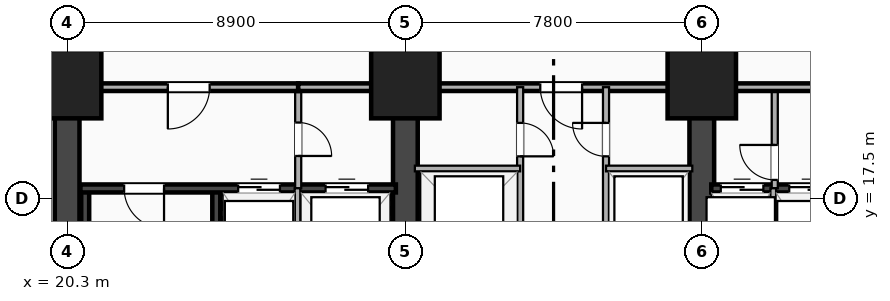
"""IFC4 building model, lengths in metres.
Left out: names, types, materials, properties, quantities, classifications, styles, units other than length and angle.
Written with IfcOpenShell. Run it as: python <this file> out.ifc"""

import sys

from ifc_helpers import new_model, si_unit, direction, frame, frame_2d, origin, origin_2d, place, context, subcontext, project, spatial, rectangle, extrude, element, fill, save


model = new_model("IFC4")
c1 = context("Model", 3, precision=1e-05, world=origin(), true_north=direction((0.0, 1.0)))
c2 = subcontext(c1, "Body", "Model", "MODEL_VIEW")
j1 = project(units=[si_unit("LENGTHUNIT", "METRE"), si_unit("PLANEANGLEUNIT", "RADIAN")], contexts=[c1])
p1 = place(None, origin())
s1 = spatial("IfcSite", under=j1, at=p1, CompositionType="ELEMENT")
p2 = place(p1, origin())
s2 = spatial("IfcBuilding", under=s1, at=p2, CompositionType="ELEMENT")
p3 = place(p2, origin())
s3 = spatial("IfcBuildingStorey", under=s2, at=p3, CompositionType="ELEMENT", Elevation=0.0)
p4 = place(p3, frame((20.3, 3.5, 0.0), z_axis=(0.0, 0.0, 1.0), x_axis=(0.0, 1.0, 0.0)))
e1 = element("IfcWall", 1, at=p4, inside=s3, PredefinedType="SHEAR", context=c2, shape_type="SweptSolid", body=[
    extrude(rectangle(XDim=16.9, YDim=0.65, at=frame_2d((8.45, 0.0))), origin(), (0.0, 0.0, 1.0), 5.1),
])
p5 = place(p3, frame((29.2, 3.5, 0.0), z_axis=(0.0, 0.0, 1.0), x_axis=(0.0, 1.0, 0.0)))
e2 = element("IfcWall", 2, at=p5, inside=s3, PredefinedType="SHEAR", context=c2, shape_type="SweptSolid", body=[
    extrude(rectangle(XDim=16.9, YDim=0.65, at=frame_2d((8.45, 0.0))), origin(), (0.0, 0.0, 1.0), 5.1),
])
p6 = place(p5, frame((7.75, 0.0, 0.0), z_axis=(0.0, 0.0, 1.0), x_axis=(-1.0, 0.0, 0.0)))
e3 = element("IfcOpeningElement", 3, at=p6, cuts=e2, PredefinedType="OPENING", context=c2, shape_type="SweptSolid", body=[
    extrude(rectangle(XDim=1.1, YDim=2.15, at=frame_2d((0.55, 1.075))), frame((0.0, 0.335, 0.0), z_axis=(0.0, -1.0, 0.0), x_axis=(1.0, 0.0, 0.0)), (0.0, 0.0, 1.0), 0.67),
])
p7 = place(p3, frame((37.0, 3.5, 0.0), z_axis=(0.0, 0.0, 1.0), x_axis=(0.0, 1.0, 0.0)))
e4 = element("IfcWall", 4, at=p7, inside=s3, PredefinedType="SHEAR", context=c2, shape_type="SweptSolid", body=[
    extrude(rectangle(XDim=16.9, YDim=0.65, at=frame_2d((8.45, 0.0))), origin(), (0.0, 0.0, 1.0), 5.1),
])
p8 = place(p7, frame((6.65, 0.0, 0.0)))
e5 = element("IfcOpeningElement", 5, at=p8, cuts=e4, PredefinedType="OPENING", context=c2, shape_type="SweptSolid", body=[
    extrude(rectangle(XDim=1.1, YDim=2.15, at=frame_2d((0.55, 1.075))), frame((0.0, 0.335, 0.0), z_axis=(0.0, -1.0, 0.0), x_axis=(1.0, 0.0, 0.0)), (0.0, 0.0, 1.0), 0.67),
])
for number, where, z_axis, x_axis in (
    (6, (20.775, 9.745, 0.0), (0.0, 0.0, 1.0), (0.0, 1.0, 0.0)),
    (7, (24.225, 9.745, 0.0), (0.0, 0.0, 1.0), (0.0, 1.0, 0.0)),
):
    element("IfcWall", number, at=place(p3, frame(where, z_axis=z_axis, x_axis=x_axis)), inside=s3, PredefinedType="SHEAR", context=c2, shape_type="SweptSolid", body=[
        extrude(rectangle(XDim=8.01, YDim=0.21, at=frame_2d((4.005, 0.0))), origin(), (0.0, 0.0, 1.0), 5.1),
    ])
p9 = place(p3, frame((20.65, 17.755, 0.0), z_axis=(0.0, 0.0, 1.0), x_axis=(1.0, 0.0, 0.0)))
e8 = element("IfcWall", 8, at=p9, inside=s3, PredefinedType="SHEAR", context=c2, shape_type="SweptSolid", body=[
    extrude(rectangle(XDim=8.3, YDim=0.21, at=frame_2d((4.15, 0.0))), origin(), (0.0, 0.0, 1.0), 5.1),
])
p10 = place(p9, frame((1.15, 0.0, 0.0)))
e9 = element("IfcOpeningElement", 9, at=p10, cuts=e8, PredefinedType="OPENING", context=c2, shape_type="SweptSolid", body=[
    extrude(rectangle(XDim=1.05, YDim=2.15, at=frame_2d((0.525, 1.075))), frame((0.0, 0.115, 0.0), z_axis=(0.0, -1.0, 0.0), x_axis=(1.0, 0.0, 0.0)), (0.0, 0.0, 1.0), 0.23),
])
p11 = place(p9, frame((4.15, 0.0, 0.0)))
e10 = element("IfcOpeningElement", 10, at=p11, cuts=e8, PredefinedType="OPENING", context=c2, shape_type="SweptSolid", body=[
    extrude(rectangle(XDim=1.1, YDim=2.18, at=frame_2d((0.55, 1.09))), frame((0.0, 0.115, 0.0), z_axis=(0.0, -1.0, 0.0), x_axis=(1.0, 0.0, 0.0)), (0.0, 0.0, 1.0), 0.23),
])
p12 = place(p9, frame((6.45, 0.0, 0.0)))
e11 = element("IfcOpeningElement", 11, at=p12, cuts=e8, PredefinedType="OPENING", context=c2, shape_type="SweptSolid", body=[
    extrude(rectangle(XDim=1.12, YDim=2.2, at=frame_2d((0.56, 1.1))), frame((0.0, 0.115, 0.0), z_axis=(0.0, -1.0, 0.0), x_axis=(1.0, 0.0, 0.0)), (0.0, 0.0, 1.0), 0.23),
])
p13 = place(p3, frame((37.25, 17.755, 0.0), z_axis=(0.0, 0.0, 1.0), x_axis=(1.0, 0.0, 0.0)))
e12 = element("IfcWall", 12, at=p13, inside=s3, PredefinedType="SHEAR", context=c2, shape_type="SweptSolid", body=[
    extrude(rectangle(XDim=7.2, YDim=0.21, at=frame_2d((3.6, 0.0))), origin(), (0.0, 0.0, 1.0), 5.1),
])
p14 = place(p13, frame((0.25, 0.0, 0.0)))
e13 = element("IfcOpeningElement", 13, at=p14, cuts=e12, PredefinedType="OPENING", context=c2, shape_type="SweptSolid", body=[
    extrude(rectangle(XDim=1.12, YDim=2.2, at=frame_2d((0.56, 1.1))), frame((0.0, 0.115, 0.0), z_axis=(0.0, -1.0, 0.0), x_axis=(1.0, 0.0, 0.0)), (0.0, 0.0, 1.0), 0.23),
])
p15 = place(p13, frame((2.05, 0.0, 0.0)))
e14 = element("IfcOpeningElement", 14, at=p15, cuts=e12, PredefinedType="OPENING", context=c2, shape_type="SweptSolid", body=[
    extrude(rectangle(XDim=1.1, YDim=2.18, at=frame_2d((0.55, 1.09))), frame((0.0, 0.115, 0.0), z_axis=(0.0, -1.0, 0.0), x_axis=(1.0, 0.0, 0.0)), (0.0, 0.0, 1.0), 0.23),
])
p16 = place(p13, frame((4.73, 0.0, 0.0)))
e15 = element("IfcOpeningElement", 15, at=p16, cuts=e12, PredefinedType="OPENING", context=c2, shape_type="SweptSolid", body=[
    extrude(rectangle(XDim=1.05, YDim=2.15, at=frame_2d((0.525, 1.075))), frame((0.0, 0.115, 0.0), z_axis=(0.0, -1.0, 0.0), x_axis=(1.0, 0.0, 0.0)), (0.0, 0.0, 1.0), 0.23),
])
for number, where, z_axis, x_axis in (
    (16, (20.3, 20.5, -0.35), (0.0, 0.0, 1.0), (1.0, 0.0, 0.0)),
    (17, (29.2, 20.5, -0.35), (0.0, 0.0, 1.0), (1.0, 0.0, 0.0)),
    (18, (37.0, 20.5, -0.35), (0.0, 0.0, 1.0), (1.0, 0.0, 0.0)),
):
    element("IfcColumn", number, at=place(p3, frame(where, z_axis=z_axis, x_axis=x_axis)), inside=s3, PredefinedType="COLUMN", context=c2, shape_type="SweptSolid", body=[
        extrude(rectangle(XDim=1.8, YDim=1.8, at=origin_2d()), origin(), (0.0, 0.0, 1.0), 5.45),
    ])
p17 = place(p3, frame((26.38, 17.76, 0.0), z_axis=(0.0, 0.0, 1.0), x_axis=(0.0, 1.0, 0.0)))
e19 = element("IfcWall", 19, at=p17, inside=s3, PredefinedType="PARTITIONING", context=c2, shape_type="SweptSolid", body=[
    extrude(rectangle(XDim=2.66, YDim=0.16, at=frame_2d((1.33, 0.0))), origin(), (0.0, 0.0, 1.0), 2.735),
])
p18 = place(p17, frame((0.85, 0.0, 0.0)))
e20 = element("IfcOpeningElement", 20, at=p18, cuts=e19, PredefinedType="OPENING", context=c2, shape_type="SweptSolid", body=[
    extrude(rectangle(XDim=0.88, YDim=2.08, at=frame_2d((0.44, 1.04))), frame((0.0, 0.09, 0.0), z_axis=(0.0, -1.0, 0.0), x_axis=(1.0, 0.0, 0.0)), (0.0, 0.0, 1.0), 0.18),
])
p19 = place(p3, frame((38.92, 17.76, 0.0), z_axis=(0.0, 0.0, 1.0), x_axis=(0.0, 1.0, 0.0)))
e21 = element("IfcWall", 21, at=p19, inside=s3, PredefinedType="PARTITIONING", context=c2, shape_type="SweptSolid", body=[
    extrude(rectangle(XDim=2.66, YDim=0.16, at=frame_2d((1.33, 0.0))), origin(), (0.0, 0.0, 1.0), 4.164),
])
p20 = place(p19, frame((1.14, 0.0, 0.0), z_axis=(0.0, 0.0, 1.0), x_axis=(-1.0, 0.0, 0.0)))
e22 = element("IfcOpeningElement", 22, at=p20, cuts=e21, PredefinedType="OPENING", context=c2, shape_type="SweptSolid", body=[
    extrude(rectangle(XDim=0.92, YDim=2.08, at=frame_2d((0.46, 1.04))), frame((0.0, 0.09, 0.0), z_axis=(0.0, -1.0, 0.0), x_axis=(1.0, 0.0, 0.0)), (0.0, 0.0, 1.0), 0.18),
])
for number, where, z_axis, x_axis in (
    (23, (26.36, 14.72, 0.0), (0.0, 0.0, 1.0), (0.0, 1.0, 0.0)),
    (24, (38.88, 14.72, 0.0), (0.0, 0.0, 1.0), (0.0, 1.0, 0.0)),
):
    element("IfcWall", number, at=place(p3, frame(where, z_axis=z_axis, x_axis=x_axis)), inside=s3, PredefinedType="PARTITIONING", context=c2, shape_type="SweptSolid", body=[
        extrude(rectangle(XDim=3.04, YDim=0.15, at=frame_2d((1.52, 0.0))), origin(), (0.0, 0.0, 1.0), 5.1),
    ])
p21 = place(p3, frame((20.65, 20.42, 0.0), z_axis=(0.0, 0.0, 1.0), x_axis=(1.0, 0.0, 0.0)))
e25 = element("IfcWall", 25, at=p21, inside=s3, PredefinedType="PARTITIONING", context=c2, shape_type="SweptSolid", body=[
    extrude(rectangle(XDim=5.73, YDim=0.2, at=frame_2d((2.865, 0.0))), origin(), (0.0, 0.0, 1.0), 2.735),
])
p22 = place(p21, frame((2.3, 0.0, 0.0)))
e26 = element("IfcOpeningElement", 26, at=p22, cuts=e25, PredefinedType="OPENING", context=c2, shape_type="SweptSolid", body=[
    extrude(rectangle(XDim=1.1, YDim=2.15, at=frame_2d((0.55, 1.075))), frame((0.0, 0.11, 0.0), z_axis=(0.0, -1.0, 0.0), x_axis=(1.0, 0.0, 0.0)), (0.0, 0.0, 1.0), 0.22),
])
p23 = place(p3, frame((26.38, 20.42, 0.0), z_axis=(0.0, 0.0, 1.0), x_axis=(1.0, 0.0, 0.0)))
e27 = element("IfcWall", 27, at=p23, inside=s3, PredefinedType="PARTITIONING", context=c2, shape_type="SweptSolid", body=[
    extrude(rectangle(XDim=2.82, YDim=0.2, at=frame_2d((1.41, 0.0))), origin(), (0.0, 0.0, 1.0), 2.735),
])
p24 = place(p3, frame((29.2, 20.42, 0.0), z_axis=(0.0, 0.0, 1.0), x_axis=(1.0, 0.0, 0.0)))
e28 = element("IfcWall", 28, at=p24, inside=s3, PredefinedType="PARTITIONING", context=c2, shape_type="SweptSolid", body=[
    extrude(rectangle(XDim=7.8, YDim=0.2, at=frame_2d((3.9, 0.0))), origin(), (0.0, 0.0, 1.0), 2.735),
])
p25 = place(p24, frame((3.55, 0.0, 0.0)))
e29 = element("IfcOpeningElement", 29, at=p25, cuts=e28, PredefinedType="OPENING", context=c2, shape_type="SweptSolid", body=[
    extrude(rectangle(XDim=1.1, YDim=2.15, at=frame_2d((0.55, 1.075))), frame((0.0, 0.11, 0.0), z_axis=(0.0, -1.0, 0.0), x_axis=(1.0, 0.0, 0.0)), (0.0, 0.0, 1.0), 0.22),
])
p26 = place(p3, frame((37.0, 20.42, 0.0), z_axis=(0.0, 0.0, 1.0), x_axis=(1.0, 0.0, 0.0)))
e30 = element("IfcWall", 30, at=p26, inside=s3, PredefinedType="PARTITIONING", context=c2, shape_type="SweptSolid", body=[
    extrude(rectangle(XDim=7.45, YDim=0.2, at=frame_2d((3.725, 0.0))), origin(), (0.0, 0.0, 1.0), 4.164),
])
p27 = place(p26, frame((4.2, 0.0, 0.0)))
e31 = element("IfcOpeningElement", 31, at=p27, cuts=e30, PredefinedType="OPENING", context=c2, shape_type="SweptSolid", body=[
    extrude(rectangle(XDim=1.1, YDim=2.15, at=frame_2d((0.55, 1.075))), frame((0.0, 0.11, 0.0), z_axis=(0.0, -1.0, 0.0), x_axis=(1.0, 0.0, 0.0)), (0.0, 0.0, 1.0), 0.22),
])
p28 = place(p3, frame((32.22, 12.5, 0.0), z_axis=(0.0, 0.0, 1.0), x_axis=(0.0, 1.0, 0.0)))
e32 = element("IfcWall", 32, at=p28, inside=s3, PredefinedType="PARTITIONING", context=c2, shape_type="SweptSolid", body=[
    extrude(rectangle(XDim=7.92, YDim=0.16, at=frame_2d((3.96, 0.0))), origin(), (0.0, 0.0, 1.0), 4.164),
])
p29 = place(p28, frame((1.43, 0.0, 0.0), z_axis=(0.0, 0.0, 1.0), x_axis=(-1.0, 0.0, 0.0)))
e33 = element("IfcOpeningElement", 33, at=p29, cuts=e32, PredefinedType="OPENING", context=c2, shape_type="SweptSolid", body=[
    extrude(rectangle(XDim=1.08, YDim=2.16, at=frame_2d((0.54, 1.08))), frame((0.0, 0.09, 0.0), z_axis=(0.0, -1.0, 0.0), x_axis=(1.0, 0.0, 0.0)), (0.0, 0.0, 1.0), 0.18),
])
p30 = place(p28, frame((4.33, 0.0, 0.0), z_axis=(0.0, 0.0, 1.0), x_axis=(-1.0, 0.0, 0.0)))
e34 = element("IfcOpeningElement", 34, at=p30, cuts=e32, PredefinedType="OPENING", context=c2, shape_type="SweptSolid", body=[
    extrude(rectangle(XDim=1.08, YDim=2.16, at=frame_2d((0.54, 1.08))), frame((0.0, 0.09, 0.0), z_axis=(0.0, -1.0, 0.0), x_axis=(1.0, 0.0, 0.0)), (0.0, 0.0, 1.0), 0.18),
])
p31 = place(p28, frame((6.1, 0.0, 0.0)))
e35 = element("IfcOpeningElement", 35, at=p31, cuts=e32, PredefinedType="OPENING", context=c2, shape_type="SweptSolid", body=[
    extrude(rectangle(XDim=0.88, YDim=2.08, at=frame_2d((0.44, 1.04))), frame((0.0, 0.09, 0.0), z_axis=(0.0, -1.0, 0.0), x_axis=(1.0, 0.0, 0.0)), (0.0, 0.0, 1.0), 0.18),
])
p32 = place(p3, frame((34.48, 12.5, 0.0), z_axis=(0.0, 0.0, 1.0), x_axis=(0.0, 1.0, 0.0)))
e36 = element("IfcWall", 36, at=p32, inside=s3, PredefinedType="PARTITIONING", context=c2, shape_type="SweptSolid", body=[
    extrude(rectangle(XDim=7.92, YDim=0.16, at=frame_2d((3.96, 0.0))), origin(), (0.0, 0.0, 1.0), 4.164),
])
p33 = place(p32, frame((0.35, 0.0, 0.0)))
e37 = element("IfcOpeningElement", 37, at=p33, cuts=e36, PredefinedType="OPENING", context=c2, shape_type="SweptSolid", body=[
    extrude(rectangle(XDim=1.08, YDim=2.16, at=frame_2d((0.54, 1.08))), frame((0.0, 0.09, 0.0), z_axis=(0.0, -1.0, 0.0), x_axis=(1.0, 0.0, 0.0)), (0.0, 0.0, 1.0), 0.18),
])
p34 = place(p32, frame((3.25, 0.0, 0.0)))
e38 = element("IfcOpeningElement", 38, at=p34, cuts=e36, PredefinedType="OPENING", context=c2, shape_type="SweptSolid", body=[
    extrude(rectangle(XDim=1.08, YDim=2.16, at=frame_2d((0.54, 1.08))), frame((0.0, 0.09, 0.0), z_axis=(0.0, -1.0, 0.0), x_axis=(1.0, 0.0, 0.0)), (0.0, 0.0, 1.0), 0.18),
])
p35 = place(p32, frame((6.98, 0.0, 0.0), z_axis=(0.0, 0.0, 1.0), x_axis=(-1.0, 0.0, 0.0)))
e39 = element("IfcOpeningElement", 39, at=p35, cuts=e36, PredefinedType="OPENING", context=c2, shape_type="SweptSolid", body=[
    extrude(rectangle(XDim=0.88, YDim=2.08, at=frame_2d((0.44, 1.04))), frame((0.0, 0.09, 0.0), z_axis=(0.0, -1.0, 0.0), x_axis=(1.0, 0.0, 0.0)), (0.0, 0.0, 1.0), 0.18),
])
p36 = place(p3, frame((29.45, 18.28, 0.0), z_axis=(0.0, 0.0, 1.0), x_axis=(1.0, 0.0, 0.0)))
e40 = element("IfcWall", 40, at=p36, inside=s3, PredefinedType="PARTITIONING", context=c2, shape_type="SweptSolid", body=[
    extrude(rectangle(XDim=2.77, YDim=0.15, at=frame_2d((1.385, 0.0))), origin(), (0.0, 0.0, 1.0), 4.23),
])
p37 = place(p3, frame((34.48, 18.28, 0.0), z_axis=(0.0, 0.0, 1.0), x_axis=(1.0, 0.0, 0.0)))
e41 = element("IfcWall", 41, at=p37, inside=s3, PredefinedType="PARTITIONING", context=c2, shape_type="SweptSolid", body=[
    extrude(rectangle(XDim=2.27, YDim=0.15, at=frame_2d((1.135, 0.0))), origin(), (0.0, 0.0, 1.0), 4.23),
])
p38 = place(p3, frame((17.9, 20.42, 0.0), z_axis=(0.0, 0.0, 1.0), x_axis=(1.0, 0.0, 0.0)))
e42 = element("IfcWall", 42, at=p38, inside=s3, PredefinedType="PARTITIONING", context=c2, shape_type="SweptSolid", body=[
    extrude(rectangle(XDim=2.4, YDim=0.2, at=frame_2d((1.2, 0.0))), origin(), (0.0, 0.0, 1.0), 2.735),
])
p39 = place(p10, origin())
e43 = element("IfcDoor", 43, at=p39, inside=s3, OperationType="SINGLE_SWING_RIGHT", PredefinedType="DOOR", context=c2, shape_type="SweptSolid", body=[
    extrude(rectangle(XDim=1.05, YDim=2.15, at=frame_2d((0.525, 1.075))), frame((0.0, 0.025, 0.0), z_axis=(0.0, -1.0, 0.0), x_axis=(1.0, 0.0, 0.0)), (0.0, 0.0, 1.0), 0.05),
])
fill(e9, e43)
p40 = place(p11, origin())
e44 = element("IfcDoor", 44, at=p40, inside=s3, OperationType="DOUBLE_DOOR_SLIDING", PredefinedType="DOOR", context=c2, shape_type="SweptSolid", body=[
    extrude(rectangle(XDim=1.1, YDim=2.18, at=frame_2d((0.55, 1.09))), frame((0.0, 0.025, 0.0), z_axis=(0.0, -1.0, 0.0), x_axis=(1.0, 0.0, 0.0)), (0.0, 0.0, 1.0), 0.05),
])
fill(e10, e44)
p41 = place(p12, origin())
e45 = element("IfcDoor", 45, at=p41, inside=s3, OperationType="DOUBLE_DOOR_SLIDING", PredefinedType="DOOR", context=c2, shape_type="SweptSolid", body=[
    extrude(rectangle(XDim=1.12, YDim=2.2, at=frame_2d((0.56, 1.1))), frame((0.0, 0.025, 0.0), z_axis=(0.0, -1.0, 0.0), x_axis=(1.0, 0.0, 0.0)), (0.0, 0.0, 1.0), 0.05),
])
fill(e11, e45)
p42 = place(p14, origin())
e46 = element("IfcDoor", 46, at=p42, inside=s3, OperationType="DOUBLE_DOOR_SLIDING", PredefinedType="DOOR", context=c2, shape_type="SweptSolid", body=[
    extrude(rectangle(XDim=1.12, YDim=2.2, at=frame_2d((0.56, 1.1))), frame((0.0, 0.025, 0.0), z_axis=(0.0, -1.0, 0.0), x_axis=(1.0, 0.0, 0.0)), (0.0, 0.0, 1.0), 0.05),
])
fill(e13, e46)
p43 = place(p15, origin())
e47 = element("IfcDoor", 47, at=p43, inside=s3, OperationType="DOUBLE_DOOR_SLIDING", PredefinedType="DOOR", context=c2, shape_type="SweptSolid", body=[
    extrude(rectangle(XDim=1.1, YDim=2.18, at=frame_2d((0.55, 1.09))), frame((0.0, 0.025, 0.0), z_axis=(0.0, -1.0, 0.0), x_axis=(1.0, 0.0, 0.0)), (0.0, 0.0, 1.0), 0.05),
])
fill(e14, e47)
p44 = place(p18, origin())
e48 = element("IfcDoor", 48, at=p44, inside=s3, OperationType="SINGLE_SWING_LEFT", PredefinedType="DOOR", context=c2, shape_type="SweptSolid", body=[
    extrude(rectangle(XDim=0.88, YDim=2.08, at=frame_2d((0.44, 1.04))), frame((0.0, 0.025, 0.0), z_axis=(0.0, -1.0, 0.0), x_axis=(1.0, 0.0, 0.0)), (0.0, 0.0, 1.0), 0.05),
])
fill(e20, e48)
p45 = place(p20, origin())
e49 = element("IfcDoor", 49, at=p45, inside=s3, OperationType="SINGLE_SWING_RIGHT", PredefinedType="DOOR", context=c2, shape_type="SweptSolid", body=[
    extrude(rectangle(XDim=0.92, YDim=2.08, at=frame_2d((0.46, 1.04))), frame((0.0, 0.025, 0.0), z_axis=(0.0, -1.0, 0.0), x_axis=(1.0, 0.0, 0.0)), (0.0, 0.0, 1.0), 0.05),
])
fill(e22, e49)
p46 = place(p22, origin())
e50 = element("IfcDoor", 50, at=p46, inside=s3, OperationType="SINGLE_SWING_LEFT", PredefinedType="DOOR", context=c2, shape_type="SweptSolid", body=[
    extrude(rectangle(XDim=1.1, YDim=2.15, at=frame_2d((0.55, 1.075))), frame((0.0, 0.025, 0.0), z_axis=(0.0, -1.0, 0.0), x_axis=(1.0, 0.0, 0.0)), (0.0, 0.0, 1.0), 0.05),
])
fill(e26, e50)
p47 = place(p25, origin())
e51 = element("IfcDoor", 51, at=p47, inside=s3, OperationType="SINGLE_SWING_RIGHT", PredefinedType="DOOR", context=c2, shape_type="SweptSolid", body=[
    extrude(rectangle(XDim=1.1, YDim=2.15, at=frame_2d((0.55, 1.075))), frame((0.0, 0.025, 0.0), z_axis=(0.0, -1.0, 0.0), x_axis=(1.0, 0.0, 0.0)), (0.0, 0.0, 1.0), 0.05),
])
fill(e29, e51)
p48 = place(p31, origin())
e52 = element("IfcDoor", 52, at=p48, inside=s3, OperationType="SINGLE_SWING_LEFT", PredefinedType="DOOR", context=c2, shape_type="SweptSolid", body=[
    extrude(rectangle(XDim=0.88, YDim=2.08, at=frame_2d((0.44, 1.04))), frame((0.0, 0.025, 0.0), z_axis=(0.0, -1.0, 0.0), x_axis=(1.0, 0.0, 0.0)), (0.0, 0.0, 1.0), 0.05),
])
fill(e35, e52)
p49 = place(p35, origin())
e53 = element("IfcDoor", 53, at=p49, inside=s3, OperationType="SINGLE_SWING_RIGHT", PredefinedType="DOOR", context=c2, shape_type="SweptSolid", body=[
    extrude(rectangle(XDim=0.88, YDim=2.08, at=frame_2d((0.44, 1.04))), frame((0.0, 0.025, 0.0), z_axis=(0.0, -1.0, 0.0), x_axis=(1.0, 0.0, 0.0)), (0.0, 0.0, 1.0), 0.05),
])
fill(e39, e53)
save(model, sys.argv[1])
